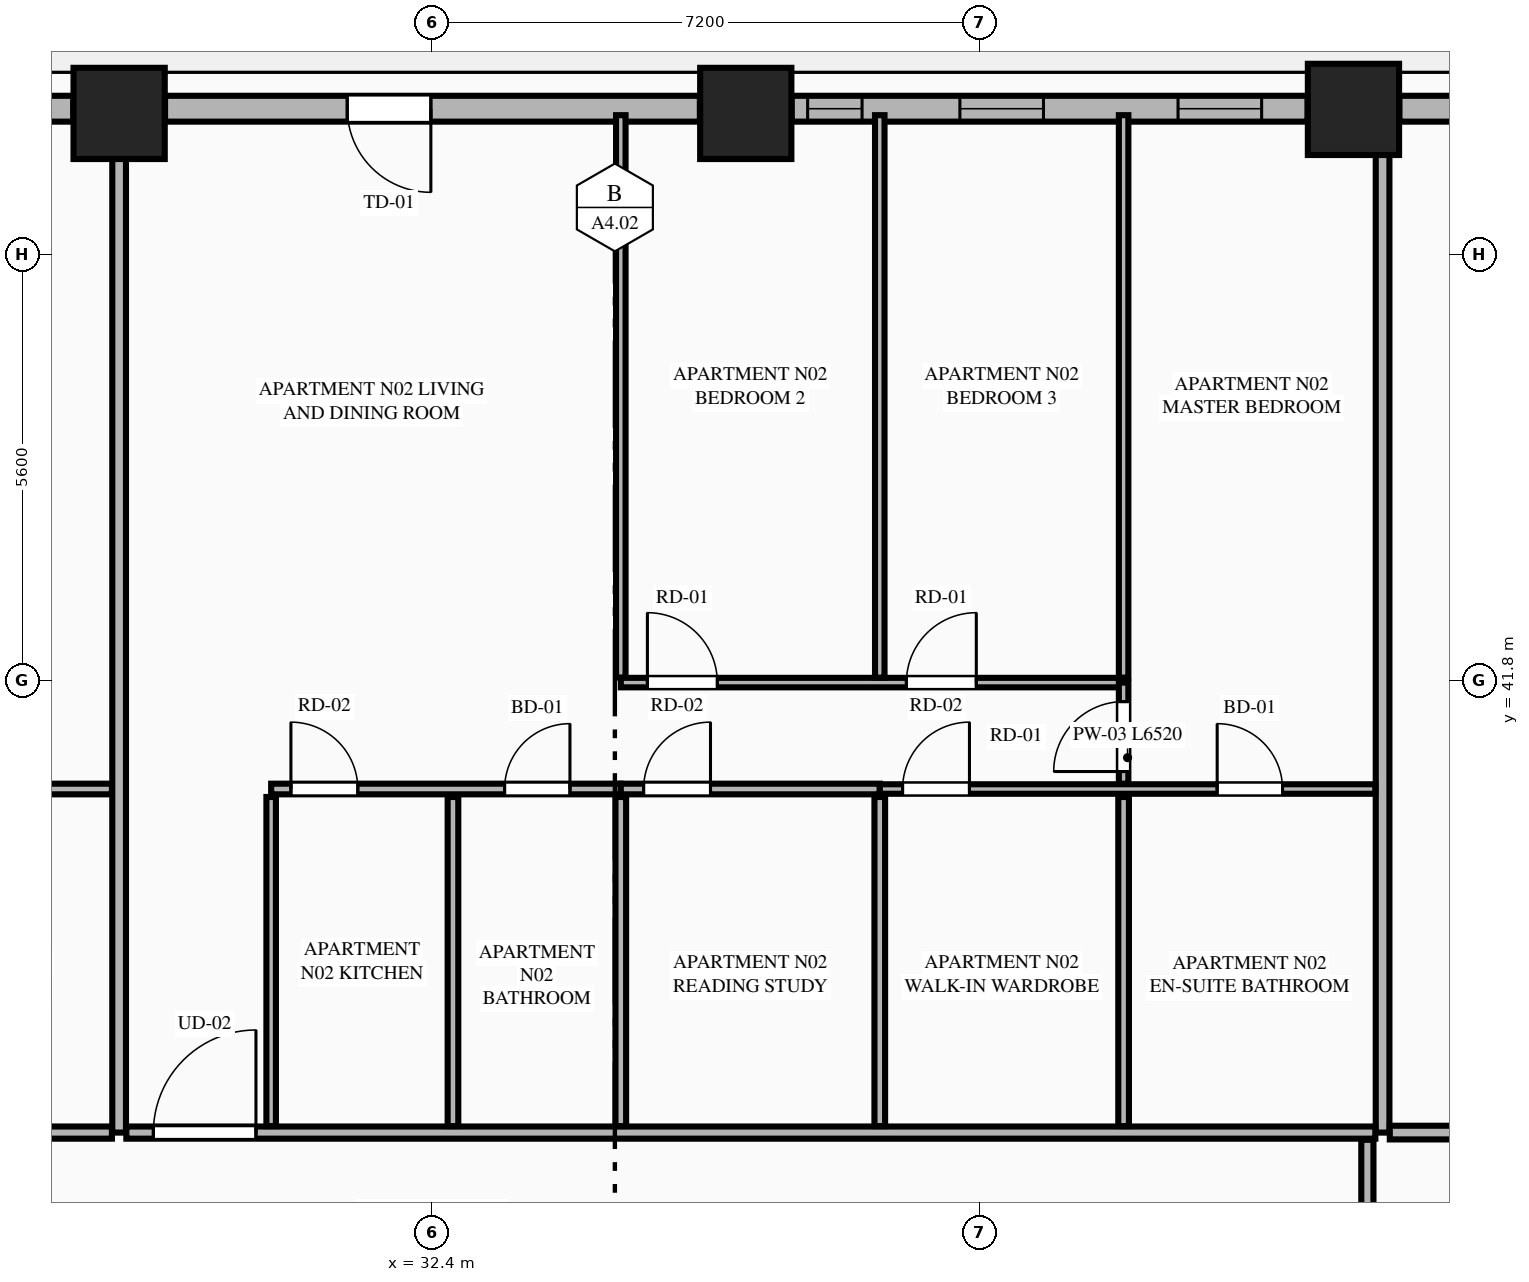
"""IFC4 building model, lengths in metres.
Left out: names, types, materials, properties, quantities, classifications, styles, units other than length and angle.
Written with IfcOpenShell. Run it as: python <this file> out.ifc"""

import sys

from ifc_helpers import new_model, si_unit, direction, frame, frame_2d, origin, origin_2d, place, context, subcontext, project, spatial, rectangle, extrude, element, fill, save


model = new_model("IFC4")
c1 = context("Model", 3, precision=1e-05, world=origin(), true_north=direction((0.0, 1.0)))
c2 = subcontext(c1, "Body", "Model", "MODEL_VIEW")
j1 = project(units=[si_unit("LENGTHUNIT", "METRE"), si_unit("PLANEANGLEUNIT", "RADIAN")], contexts=[c1])
p1 = place(None, origin())
s1 = spatial("IfcSite", under=j1, at=p1, CompositionType="ELEMENT")
p2 = place(p1, origin())
s2 = spatial("IfcBuilding", under=s1, at=p2, CompositionType="ELEMENT")
p3 = place(p2, frame((0.0, 0.0, 46.2)))
s3 = spatial("IfcBuildingStorey", under=s2, at=p3, CompositionType="ELEMENT", Elevation=46.2)
for number, where, z_axis, x_axis in (
    (1, (44.517, 49.311, 0.0), (0.0, 0.0, 1.0), (1.0, 0.0, 0.0)),
    (2, (36.522, 49.258, 0.0), (0.0, 0.0, 1.0), (1.0, 0.0, 0.0)),
    (3, (28.278, 49.258, 0.0), (0.0, 0.0, 1.0), (1.0, 0.0, 0.0)),
):
    element("IfcColumn", number, at=place(p3, frame(where, z_axis=z_axis, x_axis=x_axis)), inside=s3, PredefinedType="COLUMN", context=c2, shape_type="SweptSolid", body=[
        extrude(rectangle(XDim=1.2, YDim=1.2, at=origin_2d()), origin(), (0.0, 0.0, 1.0), 3.55),
    ])
p4 = place(p3, frame((46.366, 49.32, 0.0), z_axis=(0.0, 0.0, 1.0), x_axis=(-1.0, 0.0, 0.0)))
e4 = element("IfcWall", 4, at=p4, inside=s3, PredefinedType="STANDARD", context=c2, shape_type="SweptSolid", body=[
    extrude(rectangle(XDim=1.245, YDim=0.34, at=frame_2d((0.623, 0.0))), origin(), (0.0, 0.0, 1.0), 3.33),
])
p5 = place(p3, frame((43.913, 49.32, 0.0), z_axis=(0.0, 0.0, 1.0), x_axis=(-1.0, 0.0, 0.0)))
e5 = element("IfcWall", 5, at=p5, inside=s3, PredefinedType="STANDARD", context=c2, shape_type="SweptSolid", body=[
    extrude(rectangle(XDim=6.787, YDim=0.34, at=frame_2d((3.394, 0.0))), origin(), (0.0, 0.0, 1.0), 2.787),
])
p6 = place(p5, frame((0.604, 0.0, 0.75)))
e6 = element("IfcOpeningElement", 6, at=p6, cuts=e5, PredefinedType="OPENING", context=c2, shape_type="SweptSolid", body=[
    extrude(rectangle(XDim=1.1, YDim=1.887, at=frame_2d((0.55, 0.943))), frame((0.0, 0.18, 0.0), z_axis=(0.0, -1.0, 0.0), x_axis=(1.0, 0.0, 0.0)), (0.0, 0.0, 1.0), 0.36),
])
p7 = place(p5, frame((3.474, 0.0, 0.75)))
e7 = element("IfcOpeningElement", 7, at=p7, cuts=e5, PredefinedType="OPENING", context=c2, shape_type="SweptSolid", body=[
    extrude(rectangle(XDim=1.1, YDim=1.887, at=frame_2d((0.55, 0.943))), frame((0.0, 0.18, 0.0), z_axis=(0.0, -1.0, 0.0), x_axis=(1.0, 0.0, 0.0)), (0.0, 0.0, 1.0), 0.36),
])
p8 = place(p5, frame((5.861, 0.0, 0.75)))
e8 = element("IfcOpeningElement", 8, at=p8, cuts=e5, PredefinedType="OPENING", context=c2, shape_type="SweptSolid", body=[
    extrude(rectangle(XDim=0.716, YDim=1.887, at=frame_2d((0.358, 0.943))), frame((0.0, 0.18, 0.0), z_axis=(0.0, -1.0, 0.0), x_axis=(1.0, 0.0, 0.0)), (0.0, 0.0, 1.0), 0.36),
])
p9 = place(p3, frame((35.918, 49.32, 0.0), z_axis=(0.0, 0.0, 1.0), x_axis=(-1.0, 0.0, 0.0)))
e9 = element("IfcWall", 9, at=p9, inside=s3, PredefinedType="STANDARD", context=c2, shape_type="SweptSolid", body=[
    extrude(rectangle(XDim=7.036, YDim=0.34, at=frame_2d((3.518, 0.0))), origin(), (0.0, 0.0, 1.0), 2.787),
])
p10 = place(p9, frame((3.539, 0.0, 0.0)))
e10 = element("IfcOpeningElement", 10, at=p10, cuts=e9, PredefinedType="OPENING", context=c2, shape_type="SweptSolid", body=[
    extrude(rectangle(XDim=1.1, YDim=2.25, at=frame_2d((0.55, 1.125))), frame((0.0, 0.18, 0.0), z_axis=(0.0, -1.0, 0.0), x_axis=(1.0, 0.0, 0.0)), (0.0, 0.0, 1.0), 0.36),
])
p11 = place(p3, frame((27.674, 49.32, 0.0), z_axis=(0.0, 0.0, 1.0), x_axis=(-1.0, 0.0, 0.0)))
e11 = element("IfcWall", 11, at=p11, inside=s3, PredefinedType="STANDARD", context=c2, shape_type="SweptSolid", body=[
    extrude(rectangle(XDim=6.787, YDim=0.34, at=frame_2d((3.394, 0.0))), origin(), (0.0, 0.0, 1.0), 2.787),
])
p12 = place(p11, frame((2.843, 0.0, 0.75)))
e12 = element("IfcOpeningElement", 12, at=p12, cuts=e11, PredefinedType="OPENING", context=c2, shape_type="SweptSolid", body=[
    extrude(rectangle(XDim=1.1, YDim=1.887, at=frame_2d((0.55, 0.943))), frame((0.0, 0.18, 0.0), z_axis=(0.0, -1.0, 0.0), x_axis=(1.0, 0.0, 0.0)), (0.0, 0.0, 1.0), 0.36),
])
p13 = place(p3, frame((28.278, 35.85, 0.0), z_axis=(0.0, 0.0, 1.0), x_axis=(0.0, 1.0, 0.0)))
e13 = element("IfcWall", 13, at=p13, inside=s3, PredefinedType="PARTITIONING", context=c2, shape_type="SweptSolid", body=[
    extrude(rectangle(XDim=13.295, YDim=0.18, at=frame_2d((6.647, 0.0))), origin(), (0.0, 0.0, 1.0), 2.637),
])
p14 = place(p3, frame((44.9, 35.85, 0.0), z_axis=(0.0, 0.0, 1.0), x_axis=(0.0, 1.0, 0.0)))
e14 = element("IfcWall", 14, at=p14, inside=s3, PredefinedType="PARTITIONING", context=c2, shape_type="SweptSolid", body=[
    extrude(rectangle(XDim=13.295, YDim=0.18, at=frame_2d((6.647, 0.0))), origin(), (0.0, 0.0, 1.0), 3.33),
])
p15 = place(p3, frame((19.995, 35.85, 0.0), z_axis=(0.0, 0.0, 1.0), x_axis=(1.0, 0.0, 0.0)))
e15 = element("IfcWall", 15, at=p15, inside=s3, PredefinedType="PARTITIONING", context=c2, shape_type="SweptSolid", body=[
    extrude(rectangle(XDim=8.188, YDim=0.16, at=frame_2d((4.094, 0.0))), origin(), (0.0, 0.0, 1.0), 3.33),
])
p16 = place(p15, frame((0.705, 0.0, 0.0)))
e16 = element("IfcOpeningElement", 16, at=p16, cuts=e15, PredefinedType="OPENING", context=c2, shape_type="SweptSolid", body=[
    extrude(rectangle(XDim=1.02, YDim=2.25, at=frame_2d((0.51, 1.125))), frame((0.0, 0.09, 0.0), z_axis=(0.0, -1.0, 0.0), x_axis=(1.0, 0.0, 0.0)), (0.0, 0.0, 1.0), 0.18),
])
p17 = place(p3, frame((22.25, 40.37, 0.0), z_axis=(0.0, 0.0, 1.0), x_axis=(1.0, 0.0, 0.0)))
e17 = element("IfcWall", 17, at=p17, inside=s3, PredefinedType="PLUMBINGWALL", context=c2, shape_type="SweptSolid", body=[
    extrude(rectangle(XDim=5.933, YDim=0.14, at=frame_2d((2.967, 0.0))), origin(), (0.0, 0.0, 1.0), 3.33),
])
p18 = place(p17, frame((3.988, 0.0, 0.0)))
e18 = element("IfcOpeningElement", 18, at=p18, cuts=e17, PredefinedType="OPENING", context=c2, shape_type="SweptSolid", body=[
    extrude(rectangle(XDim=0.86, YDim=2.1, at=frame_2d((0.43, 1.05))), frame((0.0, 0.08, 0.0), z_axis=(0.0, -1.0, 0.0), x_axis=(1.0, 0.0, 0.0)), (0.0, 0.0, 1.0), 0.16),
])
p19 = place(p17, frame((0.22, 0.0, 0.0)))
e19 = element("IfcOpeningElement", 19, at=p19, cuts=e17, PredefinedType="OPENING", context=c2, shape_type="SweptSolid", body=[
    extrude(rectangle(XDim=0.88, YDim=2.15, at=frame_2d((0.44, 1.075))), frame((0.0, 0.08, 0.0), z_axis=(0.0, -1.0, 0.0), x_axis=(1.0, 0.0, 0.0)), (0.0, 0.0, 1.0), 0.16),
])
p20 = place(p3, frame((28.373, 35.85, 0.0), z_axis=(0.0, 0.0, 1.0), x_axis=(1.0, 0.0, 0.0)))
e20 = element("IfcWall", 20, at=p20, inside=s3, PredefinedType="PARTITIONING", context=c2, shape_type="SweptSolid", body=[
    extrude(rectangle(XDim=16.432, YDim=0.16, at=frame_2d((8.216, 0.0))), origin(), (0.0, 0.0, 1.0), 3.33),
])
p21 = place(p20, frame((0.355, 0.0, 0.0)))
e21 = element("IfcOpeningElement", 21, at=p21, cuts=e20, PredefinedType="OPENING", context=c2, shape_type="SweptSolid", body=[
    extrude(rectangle(XDim=1.35, YDim=2.35, at=frame_2d((0.675, 1.175))), frame((0.0, 0.09, 0.0), z_axis=(0.0, -1.0, 0.0), x_axis=(1.0, 0.0, 0.0)), (0.0, 0.0, 1.0), 0.18),
])
p22 = place(p3, frame((30.278, 35.935, 0.0), z_axis=(0.0, 0.0, 1.0), x_axis=(0.0, 1.0, 0.0)))
e22 = element("IfcWall", 22, at=p22, inside=s3, PredefinedType="PARTITIONING", context=c2, shape_type="SweptSolid", body=[
    extrude(rectangle(XDim=4.33, YDim=0.125, at=frame_2d((2.165, 0.0))), origin(), (0.0, 0.0, 1.0), 3.33),
])
p23 = place(p3, frame((30.278, 40.37, 0.0), z_axis=(0.0, 0.0, 1.0), x_axis=(1.0, 0.0, 0.0)))
e23 = element("IfcWall", 23, at=p23, inside=s3, PredefinedType="PLUMBINGWALL", context=c2, shape_type="SweptSolid", body=[
    extrude(rectangle(XDim=4.6, YDim=0.14, at=frame_2d((2.3, 0.0))), origin(), (0.0, 0.0, 1.0), 3.33),
])
p24 = place(p23, frame((3.071, 0.0, 0.0)))
e24 = element("IfcOpeningElement", 24, at=p24, cuts=e23, PredefinedType="OPENING", context=c2, shape_type="SweptSolid", body=[
    extrude(rectangle(XDim=0.86, YDim=2.1, at=frame_2d((0.43, 1.05))), frame((0.0, 0.08, 0.0), z_axis=(0.0, -1.0, 0.0), x_axis=(1.0, 0.0, 0.0)), (0.0, 0.0, 1.0), 0.16),
])
p25 = place(p23, frame((0.26, 0.0, 0.0)))
e25 = element("IfcOpeningElement", 25, at=p25, cuts=e23, PredefinedType="OPENING", context=c2, shape_type="SweptSolid", body=[
    extrude(rectangle(XDim=0.88, YDim=2.15, at=frame_2d((0.44, 1.075))), frame((0.0, 0.08, 0.0), z_axis=(0.0, -1.0, 0.0), x_axis=(1.0, 0.0, 0.0)), (0.0, 0.0, 1.0), 0.16),
])
p26 = place(p3, frame((34.878, 40.37, 0.0), z_axis=(0.0, 0.0, 1.0), x_axis=(1.0, 0.0, 0.0)))
e26 = element("IfcWall", 26, at=p26, inside=s3, PredefinedType="PLUMBINGWALL", context=c2, shape_type="SweptSolid", body=[
    extrude(rectangle(XDim=3.407, YDim=0.14, at=frame_2d((1.704, 0.0))), origin(), (0.0, 0.0, 1.0), 3.33),
])
p27 = place(p26, frame((0.3, 0.0, 0.0)))
e27 = element("IfcOpeningElement", 27, at=p27, cuts=e26, PredefinedType="OPENING", context=c2, shape_type="SweptSolid", body=[
    extrude(rectangle(XDim=0.88, YDim=2.15, at=frame_2d((0.44, 1.075))), frame((0.0, 0.08, 0.0), z_axis=(0.0, -1.0, 0.0), x_axis=(1.0, 0.0, 0.0)), (0.0, 0.0, 1.0), 0.16),
])
p28 = place(p3, frame((38.285, 40.37, 0.0), z_axis=(0.0, 0.0, 1.0), x_axis=(1.0, 0.0, 0.0)))
e28 = element("IfcWall", 28, at=p28, inside=s3, PredefinedType="PARTITIONING", context=c2, shape_type="SweptSolid", body=[
    extrude(rectangle(XDim=6.52, YDim=0.125, at=frame_2d((3.26, 0.0))), origin(), (0.0, 0.0, 1.0), 3.33),
])
p29 = place(p28, frame((4.439, 0.0, 0.0)))
e29 = element("IfcOpeningElement", 29, at=p29, cuts=e28, PredefinedType="OPENING", context=c2, shape_type="SweptSolid", body=[
    extrude(rectangle(XDim=0.86, YDim=2.1, at=frame_2d((0.43, 1.05))), frame((0.0, 0.073, 0.0), z_axis=(0.0, -1.0, 0.0), x_axis=(1.0, 0.0, 0.0)), (0.0, 0.0, 1.0), 0.145),
])
p30 = place(p28, frame((0.3, 0.0, 0.0)))
e30 = element("IfcOpeningElement", 30, at=p30, cuts=e28, PredefinedType="OPENING", context=c2, shape_type="SweptSolid", body=[
    extrude(rectangle(XDim=0.88, YDim=2.15, at=frame_2d((0.44, 1.075))), frame((0.0, 0.073, 0.0), z_axis=(0.0, -1.0, 0.0), x_axis=(1.0, 0.0, 0.0)), (0.0, 0.0, 1.0), 0.145),
])
p31 = place(p3, frame((32.67, 35.935, 0.0), z_axis=(0.0, 0.0, 1.0), x_axis=(0.0, 1.0, 0.0)))
e31 = element("IfcWall", 31, at=p31, inside=s3, PredefinedType="PLUMBINGWALL", context=c2, shape_type="SweptSolid", body=[
    extrude(rectangle(XDim=4.33, YDim=0.14, at=frame_2d((2.165, 0.0))), origin(), (0.0, 0.0, 1.0), 3.33),
])
p32 = place(p3, frame((34.878, 41.835, 0.0), z_axis=(0.0, 0.0, 1.0), x_axis=(0.0, 1.0, 0.0)))
e32 = element("IfcWall", 32, at=p32, inside=s3, PredefinedType="PARTITIONING", context=c2, shape_type="SweptSolid", body=[
    extrude(rectangle(XDim=7.4, YDim=0.125, at=frame_2d((3.7, 0.0))), origin(), (0.0, 0.0, 1.0), 3.33),
])
p33 = place(p3, frame((34.878, 41.77, 0.0), z_axis=(0.0, 0.0, 1.0), x_axis=(1.0, 0.0, 0.0)))
e33 = element("IfcWall", 33, at=p33, inside=s3, PredefinedType="PARTITIONING", context=c2, shape_type="SweptSolid", body=[
    extrude(rectangle(XDim=6.615, YDim=0.125, at=frame_2d((3.308, 0.0))), origin(), (0.0, 0.0, 1.0), 3.33),
])
p34 = place(p33, frame((0.35, 0.0, 0.0)))
e34 = element("IfcOpeningElement", 34, at=p34, cuts=e33, PredefinedType="OPENING", context=c2, shape_type="SweptSolid", body=[
    extrude(rectangle(XDim=0.92, YDim=2.15, at=frame_2d((0.46, 1.075))), frame((0.0, 0.073, 0.0), z_axis=(0.0, -1.0, 0.0), x_axis=(1.0, 0.0, 0.0)), (0.0, 0.0, 1.0), 0.145),
])
p35 = place(p33, frame((3.757, 0.0, 0.0)))
e35 = element("IfcOpeningElement", 35, at=p35, cuts=e33, PredefinedType="OPENING", context=c2, shape_type="SweptSolid", body=[
    extrude(rectangle(XDim=0.92, YDim=2.15, at=frame_2d((0.46, 1.075))), frame((0.0, 0.073, 0.0), z_axis=(0.0, -1.0, 0.0), x_axis=(1.0, 0.0, 0.0)), (0.0, 0.0, 1.0), 0.145),
])
p36 = place(p3, frame((41.493, 40.44, 0.0), z_axis=(0.0, 0.0, 1.0), x_axis=(0.0, 1.0, 0.0)))
e36 = element("IfcWall", 36, at=p36, inside=s3, PredefinedType="PARTITIONING", context=c2, shape_type="SweptSolid", body=[
    extrude(rectangle(XDim=1.33, YDim=0.125, at=frame_2d((0.665, 0.0))), origin(), (0.0, 0.0, 1.0), 3.33),
])
p37 = place(p36, frame((0.16, 0.0, 0.0)))
e37 = element("IfcOpeningElement", 37, at=p37, cuts=e36, PredefinedType="OPENING", context=c2, shape_type="SweptSolid", body=[
    extrude(rectangle(XDim=0.92, YDim=2.15, at=frame_2d((0.46, 1.075))), frame((0.0, 0.073, 0.0), z_axis=(0.0, -1.0, 0.0), x_axis=(1.0, 0.0, 0.0)), (0.0, 0.0, 1.0), 0.145),
])
for number, where, z_axis, x_axis in (
    (38, (34.878, 35.935, 0.0), (0.0, 0.0, 1.0), (0.0, 1.0, 0.0)),
    (39, (38.285, 35.935, 0.0), (0.0, 0.0, 1.0), (0.0, 1.0, 0.0)),
):
    element("IfcWall", number, at=place(p3, frame(where, z_axis=z_axis, x_axis=x_axis)), inside=s3, PredefinedType="PLUMBINGWALL", context=c2, shape_type="SweptSolid", body=[
        extrude(rectangle(XDim=4.33, YDim=0.14, at=frame_2d((2.165, 0.0))), origin(), (0.0, 0.0, 1.0), 3.33),
    ])
for number, where, z_axis, x_axis in (
    (40, (38.285, 41.835, 0.0), (0.0, 0.0, 1.0), (0.0, 1.0, 0.0)),
    (41, (41.493, 41.835, 0.0), (0.0, 0.0, 1.0), (0.0, 1.0, 0.0)),
):
    element("IfcWall", number, at=place(p3, frame(where, z_axis=z_axis, x_axis=x_axis)), inside=s3, PredefinedType="PARTITIONING", context=c2, shape_type="SweptSolid", body=[
        extrude(rectangle(XDim=7.4, YDim=0.125, at=frame_2d((3.7, 0.0))), origin(), (0.0, 0.0, 1.0), 3.33),
    ])
p38 = place(p3, frame((41.493, 35.935, 0.0), z_axis=(0.0, 0.0, 1.0), x_axis=(0.0, 1.0, 0.0)))
e42 = element("IfcWall", 42, at=p38, inside=s3, PredefinedType="PLUMBINGWALL", context=c2, shape_type="SweptSolid", body=[
    extrude(rectangle(XDim=4.33, YDim=0.14, at=frame_2d((2.165, 0.0))), origin(), (0.0, 0.0, 1.0), 3.33),
])
p39 = place(p3, frame((44.995, 35.85, 0.0), z_axis=(0.0, 0.0, 1.0), x_axis=(1.0, 0.0, 0.0)))
e43 = element("IfcWall", 43, at=p39, inside=s3, PredefinedType="PARTITIONING", context=c2, shape_type="SweptSolid", body=[
    extrude(rectangle(XDim=9.14, YDim=0.18, at=frame_2d((4.57, 0.0))), origin(), (0.0, 0.0, 1.0), 3.33),
])
p40 = place(p3, frame((44.7, 16.045, 0.0), z_axis=(0.0, 0.0, 1.0), x_axis=(0.0, 1.0, 0.0)))
e44 = element("IfcWall", 44, at=p40, inside=s3, PredefinedType="PARTITIONING", context=c2, shape_type="SweptSolid", body=[
    extrude(rectangle(XDim=19.71, YDim=0.16, at=frame_2d((9.855, 0.0))), origin(), (0.0, 0.0, 1.0), 3.33),
])
p41 = place(p40, frame((0.45, 0.0, 0.0)))
e45 = element("IfcOpeningElement", 45, at=p41, cuts=e44, PredefinedType="OPENING", context=c2, shape_type="SweptSolid", body=[
    extrude(rectangle(XDim=1.02, YDim=2.25, at=frame_2d((0.51, 1.125))), frame((0.0, 0.09, 0.0), z_axis=(0.0, -1.0, 0.0), x_axis=(1.0, 0.0, 0.0)), (0.0, 0.0, 1.0), 0.18),
])
p42 = place(p6, origin())
e46 = element("IfcWindow", 46, at=p42, inside=s3, PartitioningType="SINGLE_PANEL", PredefinedType="WINDOW", context=c2, shape_type="SweptSolid", body=[
    extrude(rectangle(XDim=1.1, YDim=1.887, at=frame_2d((0.55, 0.943))), frame((0.0, 0.03, 0.0), z_axis=(0.0, -1.0, 0.0), x_axis=(1.0, 0.0, 0.0)), (0.0, 0.0, 1.0), 0.06),
])
fill(e6, e46)
p43 = place(p10, origin())
e47 = element("IfcDoor", 47, at=p43, inside=s3, OperationType="SINGLE_SWING_LEFT", PredefinedType="DOOR", context=c2, shape_type="SweptSolid", body=[
    extrude(rectangle(XDim=1.1, YDim=2.25, at=frame_2d((0.55, 1.125))), frame((0.0, 0.025, 0.0), z_axis=(0.0, -1.0, 0.0), x_axis=(1.0, 0.0, 0.0)), (0.0, 0.0, 1.0), 0.05),
])
fill(e10, e47)
p44 = place(p24, origin())
e48 = element("IfcDoor", 48, at=p44, inside=s3, OperationType="SINGLE_SWING_RIGHT", PredefinedType="DOOR", context=c2, shape_type="SweptSolid", body=[
    extrude(rectangle(XDim=0.86, YDim=2.1, at=frame_2d((0.43, 1.05))), frame((0.0, 0.025, 0.0), z_axis=(0.0, -1.0, 0.0), x_axis=(1.0, 0.0, 0.0)), (0.0, 0.0, 1.0), 0.05),
])
fill(e24, e48)
p45 = place(p29, origin())
e49 = element("IfcDoor", 49, at=p45, inside=s3, OperationType="SINGLE_SWING_LEFT", PredefinedType="DOOR", context=c2, shape_type="SweptSolid", body=[
    extrude(rectangle(XDim=0.86, YDim=2.1, at=frame_2d((0.43, 1.05))), frame((0.0, 0.025, 0.0), z_axis=(0.0, -1.0, 0.0), x_axis=(1.0, 0.0, 0.0)), (0.0, 0.0, 1.0), 0.05),
])
fill(e29, e49)
p46 = place(p21, origin())
e50 = element("IfcDoor", 50, at=p46, inside=s3, OperationType="SINGLE_SWING_RIGHT", PredefinedType="DOOR", context=c2, shape_type="SweptSolid", body=[
    extrude(rectangle(XDim=1.35, YDim=2.35, at=frame_2d((0.675, 1.175))), frame((0.0, 0.025, 0.0), z_axis=(0.0, -1.0, 0.0), x_axis=(1.0, 0.0, 0.0)), (0.0, 0.0, 1.0), 0.05),
])
fill(e21, e50)
p47 = place(p25, origin())
e51 = element("IfcDoor", 51, at=p47, inside=s3, OperationType="SINGLE_SWING_LEFT", PredefinedType="DOOR", context=c2, shape_type="SweptSolid", body=[
    extrude(rectangle(XDim=0.88, YDim=2.15, at=frame_2d((0.44, 1.075))), frame((0.0, 0.025, 0.0), z_axis=(0.0, -1.0, 0.0), x_axis=(1.0, 0.0, 0.0)), (0.0, 0.0, 1.0), 0.05),
])
fill(e25, e51)
p48 = place(p27, origin())
e52 = element("IfcDoor", 52, at=p48, inside=s3, OperationType="SINGLE_SWING_RIGHT", PredefinedType="DOOR", context=c2, shape_type="SweptSolid", body=[
    extrude(rectangle(XDim=0.88, YDim=2.15, at=frame_2d((0.44, 1.075))), frame((0.0, 0.025, 0.0), z_axis=(0.0, -1.0, 0.0), x_axis=(1.0, 0.0, 0.0)), (0.0, 0.0, 1.0), 0.05),
])
fill(e27, e52)
p49 = place(p34, origin())
e53 = element("IfcDoor", 53, at=p49, inside=s3, OperationType="SINGLE_SWING_LEFT", PredefinedType="DOOR", context=c2, shape_type="SweptSolid", body=[
    extrude(rectangle(XDim=0.92, YDim=2.15, at=frame_2d((0.46, 1.075))), frame((0.0, 0.025, 0.0), z_axis=(0.0, -1.0, 0.0), x_axis=(1.0, 0.0, 0.0)), (0.0, 0.0, 1.0), 0.05),
])
fill(e34, e53)
p50 = place(p35, origin())
e54 = element("IfcDoor", 54, at=p50, inside=s3, OperationType="SINGLE_SWING_RIGHT", PredefinedType="DOOR", context=c2, shape_type="SweptSolid", body=[
    extrude(rectangle(XDim=0.92, YDim=2.15, at=frame_2d((0.46, 1.075))), frame((0.0, 0.025, 0.0), z_axis=(0.0, -1.0, 0.0), x_axis=(1.0, 0.0, 0.0)), (0.0, 0.0, 1.0), 0.05),
])
fill(e35, e54)
p51 = place(p37, origin())
e55 = element("IfcDoor", 55, at=p51, inside=s3, OperationType="SINGLE_SWING_LEFT", PredefinedType="DOOR", context=c2, shape_type="SweptSolid", body=[
    extrude(rectangle(XDim=0.92, YDim=2.15, at=frame_2d((0.46, 1.075))), frame((0.0, 0.025, 0.0), z_axis=(0.0, -1.0, 0.0), x_axis=(1.0, 0.0, 0.0)), (0.0, 0.0, 1.0), 0.05),
])
fill(e37, e55)
p52 = place(p30, origin())
e56 = element("IfcDoor", 56, at=p52, inside=s3, OperationType="SINGLE_SWING_RIGHT", PredefinedType="DOOR", context=c2, shape_type="SweptSolid", body=[
    extrude(rectangle(XDim=0.88, YDim=2.15, at=frame_2d((0.44, 1.075))), frame((0.0, 0.025, 0.0), z_axis=(0.0, -1.0, 0.0), x_axis=(1.0, 0.0, 0.0)), (0.0, 0.0, 1.0), 0.05),
])
fill(e30, e56)
p53 = place(p7, origin())
e57 = element("IfcWindow", 57, at=p53, inside=s3, PartitioningType="SINGLE_PANEL", PredefinedType="WINDOW", context=c2, shape_type="SweptSolid", body=[
    extrude(rectangle(XDim=1.1, YDim=1.887, at=frame_2d((0.55, 0.943))), frame((0.0, 0.03, 0.0), z_axis=(0.0, -1.0, 0.0), x_axis=(1.0, 0.0, 0.0)), (0.0, 0.0, 1.0), 0.06),
])
fill(e7, e57)
p54 = place(p8, origin())
e58 = element("IfcWindow", 58, at=p54, inside=s3, PartitioningType="SINGLE_PANEL", PredefinedType="WINDOW", context=c2, shape_type="SweptSolid", body=[
    extrude(rectangle(XDim=0.716, YDim=1.887, at=frame_2d((0.358, 0.943))), frame((0.0, 0.03, 0.0), z_axis=(0.0, -1.0, 0.0), x_axis=(1.0, 0.0, 0.0)), (0.0, 0.0, 1.0), 0.06),
])
fill(e8, e58)
save(model, sys.argv[1])
